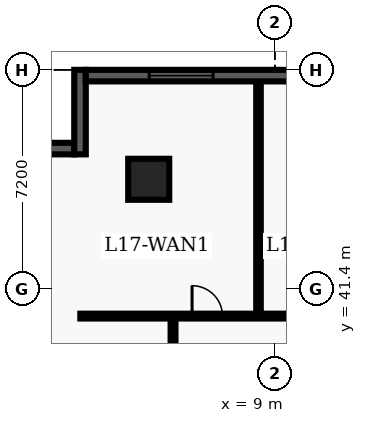
"""IFC4 building model, lengths in metres.
Left out: names, types, materials, properties, quantities, classifications, styles, units other than length and angle.
Written with IfcOpenShell. Run it as: python <this file> out.ifc"""

import sys

from ifc_helpers import new_model, entity, si_unit, converted_unit, direction, frame, origin_with_axes, origin_2d_with_axis, place, context, subcontext, project, spatial, polyline, rectangle, outline, extrude, element, fill, save


model = new_model("IFC4")
c1 = context("Model", 3, precision=1e-05, world=origin_with_axes(), true_north=direction((0.0, 1.0)))
c2 = subcontext(c1, "Body", "Model", "MODEL_VIEW")
j1 = project(units=[si_unit("LENGTHUNIT", "METRE"), converted_unit("PLANEANGLEUNIT", "DEGREE", entity("IfcPlaneAngleMeasure", 0.017), si_unit("PLANEANGLEUNIT", "RADIAN"), dimensions=[0, 0, 0, 0, 0, 0, 0])], contexts=[c1])
p1 = place(None, origin_with_axes())
s1 = spatial("IfcSite", under=j1, at=p1, CompositionType="ELEMENT")
p2 = place(p1, origin_with_axes())
s2 = spatial("IfcBuilding", under=s1, at=p2, CompositionType="ELEMENT")
p3 = place(p2, frame((0.0, 0.0, 71.7), z_axis=(0.0, 0.0, 1.0), x_axis=(1.0, 0.0, 0.0)))
s3 = spatial("IfcBuildingStorey", under=s2, at=p3, CompositionType="ELEMENT", Elevation=71.7)
p4 = place(p3, frame((4.85, 45.0, 0.0), z_axis=(0.0, 0.0, 1.0), x_axis=(1.0, 0.0, 0.0)))
e1 = element("IfcColumn", 1, at=p4, inside=s3, PredefinedType="COLUMN", context=c2, shape_type="SweptSolid", body=[
    extrude(rectangle(XDim=1.35, YDim=1.35, at=origin_2d_with_axis()), origin_with_axes(), (0.0, 0.0, 1.0), 3.9),
])
p5 = place(p3, frame((2.6, 40.5, 0.0), z_axis=(0.0, 0.0, 1.0), x_axis=(1.0, 0.0, 0.0)))
e2 = element("IfcWall", 2, at=p5, inside=s3, PredefinedType="PARTITIONING", context=c2, shape_type="SweptSolid", body=[
    extrude(outline(polyline([(0.0, -0.08), (18.65, -0.08), (18.65, 0.08), (0.0, 0.08), (0.0, -0.08)])), origin_with_axes(), (0.0, 0.0, 1.0), 2.7),
])
p6 = place(p5, frame((4.176, 0.0, 0.0), z_axis=(0.0, 0.0, 1.0), x_axis=(1.0, 0.0, 0.0)))
e3 = element("IfcOpeningElement", 3, at=p6, cuts=e2, PredefinedType="OPENING", context=c2, shape_type="SweptSolid", body=[
    extrude(rectangle(XDim=1.0, YDim=0.18, at=origin_2d_with_axis()), origin_with_axes(), (0.0, 0.0, 1.0), 2.15),
])
p7 = place(p5, frame((9.257, 0.0, 0.0), z_axis=(0.0, 0.0, 1.0), x_axis=(1.0, 0.0, 0.0)))
e4 = element("IfcOpeningElement", 4, at=p7, cuts=e2, PredefinedType="OPENING", context=c2, shape_type="SweptSolid", body=[
    extrude(rectangle(XDim=1.2, YDim=0.18, at=origin_2d_with_axis()), origin_with_axes(), (0.0, 0.0, 1.0), 2.2),
])
p8 = place(p5, frame((14.536, 0.0, 0.0), z_axis=(0.0, 0.0, 1.0), x_axis=(1.0, 0.0, 0.0)))
e5 = element("IfcOpeningElement", 5, at=p8, cuts=e2, PredefinedType="OPENING", context=c2, shape_type="SweptSolid", body=[
    extrude(rectangle(XDim=1.0, YDim=0.18, at=origin_2d_with_axis()), origin_with_axes(), (0.0, 0.0, 1.0), 2.15),
])
p9 = place(p3, frame((5.65, 7.8, 0.0), z_axis=(0.0, 0.0, 1.0), x_axis=(0.0, 1.0, 0.0)))
e6 = element("IfcWall", 6, at=p9, inside=s3, PredefinedType="PARTITIONING", context=c2, shape_type="SweptSolid", body=[
    extrude(outline(polyline([(0.0, -0.08), (32.7, -0.08), (32.7, 0.08), (0.0, 0.08), (0.0, -0.08)])), origin_with_axes(), (0.0, 0.0, 1.0), 2.7),
])
p10 = place(p9, frame((4.369, 0.0, 0.0), z_axis=(0.0, 0.0, 1.0), x_axis=(1.0, 0.0, 0.0)))
e7 = element("IfcOpeningElement", 7, at=p10, cuts=e6, PredefinedType="OPENING", context=c2, shape_type="SweptSolid", body=[
    extrude(rectangle(XDim=1.0, YDim=0.18, at=origin_2d_with_axis()), origin_with_axes(), (0.0, 0.0, 1.0), 2.15),
])
p11 = place(p9, frame((13.998, 0.0, 0.0), z_axis=(0.0, 0.0, 1.0), x_axis=(1.0, 0.0, 0.0)))
e8 = element("IfcOpeningElement", 8, at=p11, cuts=e6, PredefinedType="OPENING", context=c2, shape_type="SweptSolid", body=[
    extrude(rectangle(XDim=1.0, YDim=0.18, at=origin_2d_with_axis()), origin_with_axes(), (0.0, 0.0, 1.0), 2.15),
])
p12 = place(p9, frame((25.979, 0.0, 0.0), z_axis=(0.0, 0.0, 1.0), x_axis=(1.0, 0.0, 0.0)))
e9 = element("IfcOpeningElement", 9, at=p12, cuts=e6, PredefinedType="OPENING", context=c2, shape_type="SweptSolid", body=[
    extrude(rectangle(XDim=1.0, YDim=0.18, at=origin_2d_with_axis()), origin_with_axes(), (0.0, 0.0, 1.0), 2.15),
])
p13 = place(p3, frame((8.461, 40.6, 0.0), z_axis=(0.0, 0.0, 1.0), x_axis=(0.0, 1.0, 0.0)))
e10 = element("IfcWall", 10, at=p13, inside=s3, PredefinedType="PARTITIONING", context=c2, shape_type="SweptSolid", body=[
    extrude(outline(polyline([(0.0, -0.075), (7.64, -0.075), (7.64, 0.075), (0.0, 0.075), (0.0, -0.075)])), origin_with_axes(), (0.0, 0.0, 1.0), 2.7),
])
p14 = place(p3, frame((0.38, 46.01, 0.0), z_axis=(0.0, 0.0, 1.0), x_axis=(1.0, 0.0, 0.0)))
e11 = element("IfcWall", 11, at=p14, inside=s3, PredefinedType="SOLIDWALL", context=c2, shape_type="SweptSolid", body=[
    extrude(outline(polyline([(0.0, -0.19), (2.02, -0.19), (2.02, 0.19), (0.0, 0.19), (0.0, -0.19)])), origin_with_axes(), (0.0, 0.0, 1.0), 3.66),
])
p15 = place(p3, frame((2.59, 45.82, 0.0), z_axis=(0.0, 0.0, 1.0), x_axis=(0.0, 1.0, 0.0)))
e12 = element("IfcWall", 12, at=p15, inside=s3, PredefinedType="SOLIDWALL", context=c2, shape_type="SweptSolid", body=[
    extrude(outline(polyline([(0.0, -0.19), (2.78, -0.19), (2.78, 0.19), (0.0, 0.19), (0.0, -0.19)])), origin_with_axes(), (0.0, 0.0, 1.0), 3.66),
])
p16 = place(p3, frame((2.78, 48.41, 0.0), z_axis=(0.0, 0.0, 1.0), x_axis=(1.0, 0.0, 0.0)))
e13 = element("IfcWall", 13, at=p16, inside=s3, PredefinedType="SOLIDWALL", context=c2, shape_type="SweptSolid", body=[
    extrude(outline(polyline([(0.0, -0.19), (16.42, -0.19), (16.42, 0.19), (0.0, 0.19), (0.0, -0.19)])), origin_with_axes(), (0.0, 0.0, 1.0), 3.66),
])
p17 = place(p16, frame((3.137, 0.0, 0.45), z_axis=(0.0, 0.0, 1.0), x_axis=(1.0, 0.0, 0.0)))
e14 = element("IfcOpeningElement", 14, at=p17, cuts=e13, PredefinedType="OPENING", context=c2, shape_type="SweptSolid", body=[
    extrude(rectangle(XDim=2.1, YDim=0.4, at=origin_2d_with_axis()), origin_with_axes(), (0.0, 0.0, 1.0), 2.2),
])
p18 = place(p16, frame((8.21, 0.0, 0.45), z_axis=(0.0, 0.0, 1.0), x_axis=(1.0, 0.0, 0.0)))
e15 = element("IfcOpeningElement", 15, at=p18, cuts=e13, PredefinedType="OPENING", context=c2, shape_type="SweptSolid", body=[
    extrude(rectangle(XDim=2.1, YDim=0.4, at=origin_2d_with_axis()), origin_with_axes(), (0.0, 0.0, 1.0), 2.2),
])
p19 = place(p16, frame((14.133, 0.0, 0.45), z_axis=(0.0, 0.0, 1.0), x_axis=(1.0, 0.0, 0.0)))
e16 = element("IfcOpeningElement", 16, at=p19, cuts=e13, PredefinedType="OPENING", context=c2, shape_type="SweptSolid", body=[
    extrude(rectangle(XDim=2.1, YDim=0.4, at=origin_2d_with_axis()), origin_with_axes(), (0.0, 0.0, 1.0), 2.2),
])
p20 = place(p5, frame((4.176, 0.0, 0.0), z_axis=(0.0, 0.0, 1.0), x_axis=(1.0, 0.0, 0.0)))
e17 = element("IfcDoor", 17, at=p20, inside=s3, OperationType="SINGLE_SWING_LEFT", PredefinedType="DOOR", context=c2, shape_type="SweptSolid", body=[
    extrude(rectangle(XDim=1.0, YDim=0.09, at=origin_2d_with_axis()), origin_with_axes(), (0.0, 0.0, 1.0), 2.15),
])
fill(e3, e17)
p21 = place(p16, frame((3.137, 0.0, 0.45), z_axis=(0.0, 0.0, 1.0), x_axis=(1.0, 0.0, 0.0)))
e18 = element("IfcWindow", 18, at=p21, inside=s3, PredefinedType="WINDOW", context=c2, shape_type="SweptSolid", body=[
    extrude(rectangle(XDim=2.1, YDim=0.09, at=origin_2d_with_axis()), origin_with_axes(), (0.0, 0.0, 1.0), 2.2),
])
fill(e14, e18)
save(model, sys.argv[1])
